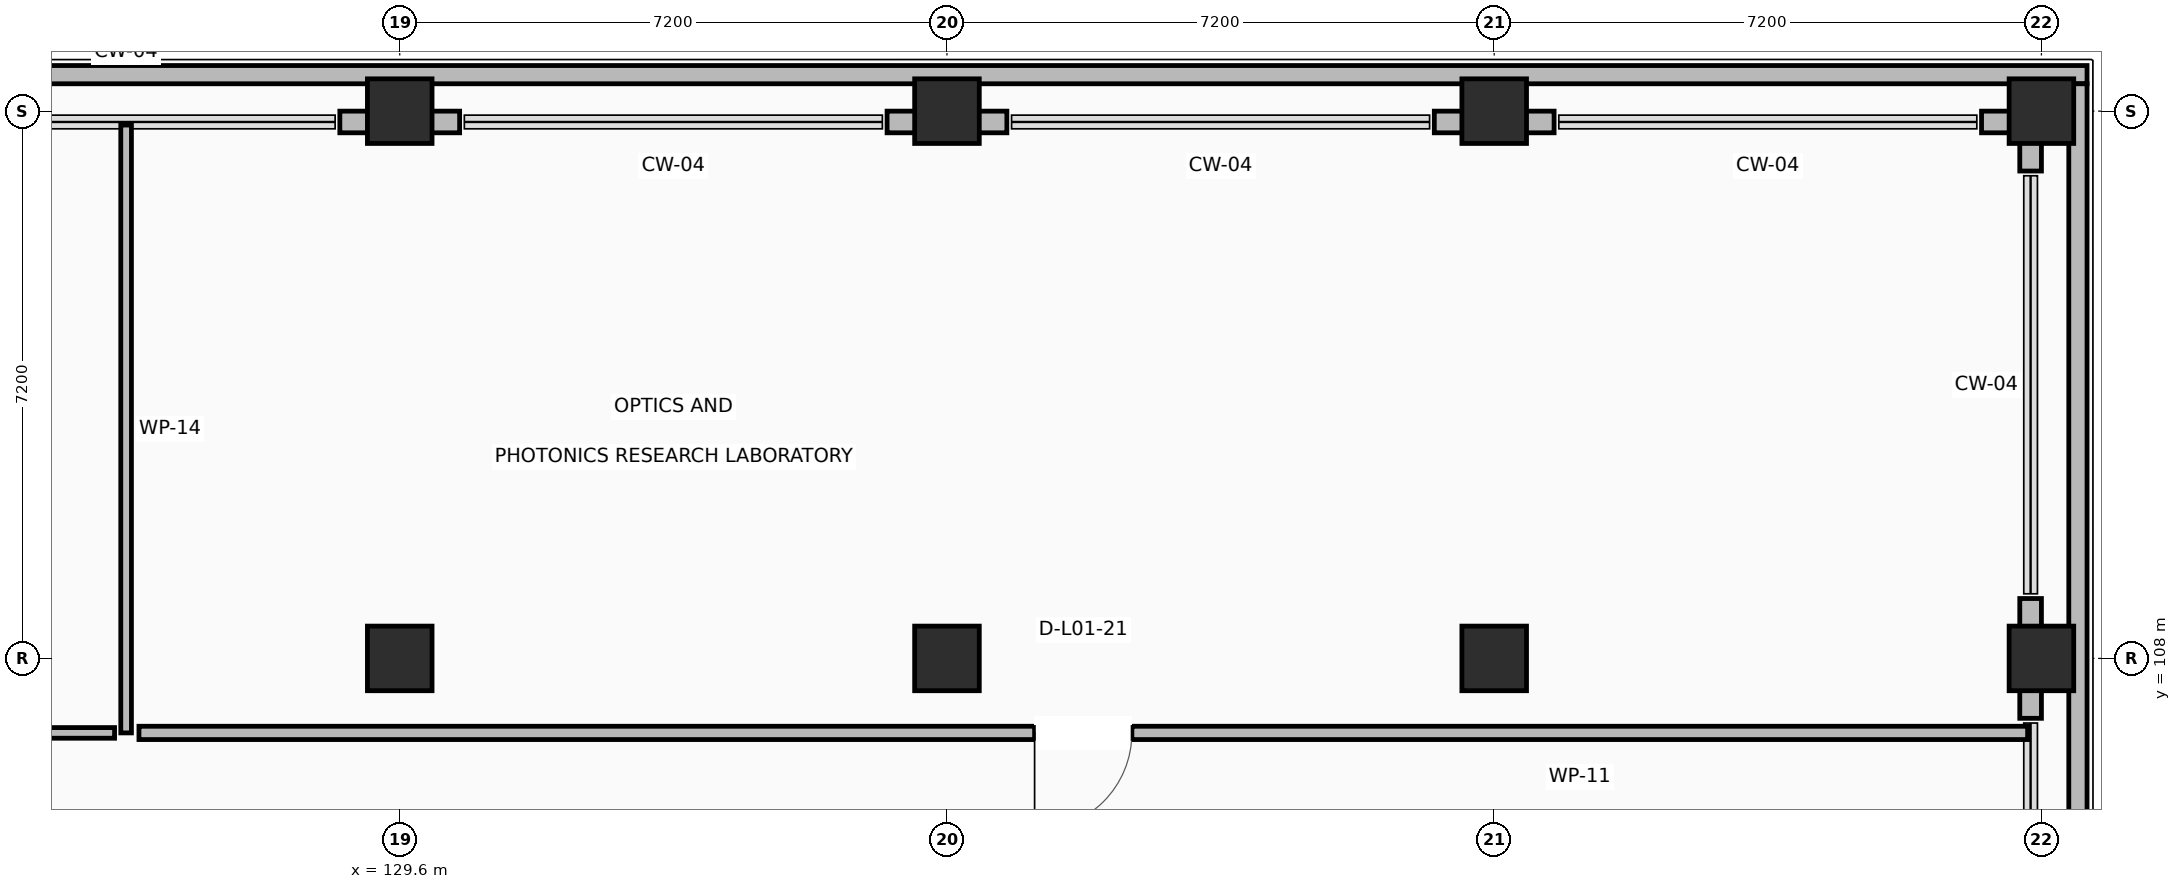
"""IFC4 building model, lengths in metres.
Left out: names, types, materials, properties, quantities, classifications, styles, units other than length and angle.
Written with IfcOpenShell. Run it as: python <this file> out.ifc"""

import sys

from ifc_helpers import new_model, si_unit, direction, frame, frame_2d, origin, origin_2d, place, context, subcontext, project, spatial, rectangle, extrude, element, fill, save


model = new_model("IFC4")
c1 = context("Model", 3, precision=1e-05, world=origin(), true_north=direction((0.0, 1.0)))
c2 = subcontext(c1, "Body", "Model", "MODEL_VIEW")
j1 = project(units=[si_unit("LENGTHUNIT", "METRE"), si_unit("PLANEANGLEUNIT", "RADIAN")], contexts=[c1])
p1 = place(None, origin())
s1 = spatial("IfcSite", under=j1, at=p1, CompositionType="ELEMENT")
p2 = place(p1, origin())
s2 = spatial("IfcBuilding", under=s1, at=p2, CompositionType="ELEMENT")
p3 = place(p2, frame((0.0, 0.0, 4.5)))
s3 = spatial("IfcBuildingStorey", under=s2, at=p3, CompositionType="ELEMENT", Elevation=4.5)
for number, where, z_axis, x_axis in (
    (1, (129.6, 108.0, 0.0), (0.0, 0.0, 1.0), (1.0, 0.0, 0.0)),
    (2, (129.6, 115.2, 0.0), (0.0, 0.0, 1.0), (1.0, 0.0, 0.0)),
    (3, (136.8, 108.0, 0.0), (0.0, 0.0, 1.0), (1.0, 0.0, 0.0)),
    (4, (136.8, 115.2, 0.0), (0.0, 0.0, 1.0), (1.0, 0.0, 0.0)),
    (5, (144.0, 108.0, 0.0), (0.0, 0.0, 1.0), (1.0, 0.0, 0.0)),
    (6, (144.0, 115.2, 0.0), (0.0, 0.0, 1.0), (1.0, 0.0, 0.0)),
    (7, (151.2, 108.0, 0.0), (0.0, 0.0, 1.0), (1.0, 0.0, 0.0)),
    (8, (151.2, 115.2, 0.0), (0.0, 0.0, 1.0), (1.0, 0.0, 0.0)),
):
    element("IfcColumn", number, at=place(p3, frame(where, z_axis=z_axis, x_axis=x_axis)), inside=s3, PredefinedType="COLUMN", context=c2, shape_type="SweptSolid", body=[
        extrude(rectangle(XDim=0.85, YDim=0.85, at=origin_2d()), origin(), (0.0, 0.0, 1.0), 4.22),
    ])
p4 = place(p3, frame((151.058, 107.212, 0.0), z_axis=(0.0, 0.0, 1.0), x_axis=(0.0, 1.0, 0.0)))
e9 = element("IfcWall", 9, at=p4, inside=s3, PredefinedType="STANDARD", context=c2, shape_type="SweptSolid", body=[
    extrude(rectangle(XDim=1.576, YDim=0.285, at=frame_2d((0.788, 0.0))), origin(), (0.0, 0.0, 1.0), 3.26),
])
p5 = place(p3, frame((151.058, 114.412, 0.0), z_axis=(0.0, 0.0, 1.0), x_axis=(0.0, 1.0, 0.0)))
e10 = element("IfcWall", 10, at=p5, inside=s3, PredefinedType="STANDARD", context=c2, shape_type="SweptSolid", body=[
    extrude(rectangle(XDim=0.503, YDim=0.285, at=frame_2d((0.251, 0.0))), origin(), (0.0, 0.0, 1.0), 3.26),
])
p6 = place(p3, frame((151.2, 115.058, 0.0), z_axis=(0.0, 0.0, 1.0), x_axis=(-1.0, 0.0, 0.0)))
e11 = element("IfcWall", 11, at=p6, inside=s3, PredefinedType="STANDARD", context=c2, shape_type="SweptSolid", body=[
    extrude(rectangle(XDim=0.788, YDim=0.285, at=frame_2d((0.394, 0.0))), origin(), (0.0, 0.0, 1.0), 3.26),
])
p7 = place(p3, frame((144.788, 115.058, 0.0), z_axis=(0.0, 0.0, 1.0), x_axis=(-1.0, 0.0, 0.0)))
e12 = element("IfcWall", 12, at=p7, inside=s3, PredefinedType="STANDARD", context=c2, shape_type="SweptSolid", body=[
    extrude(rectangle(XDim=1.576, YDim=0.285, at=frame_2d((0.788, 0.0))), origin(), (0.0, 0.0, 1.0), 3.26),
])
for number, where, z_axis, x_axis in (
    (13, (137.588, 115.058, 0.0), (0.0, 0.0, 1.0), (-1.0, 0.0, 0.0)),
    (14, (130.388, 115.058, 0.0), (0.0, 0.0, 1.0), (-1.0, 0.0, 0.0)),
):
    element("IfcWall", number, at=place(p3, frame(where, z_axis=z_axis, x_axis=x_axis)), inside=s3, PredefinedType="STANDARD", context=c2, shape_type="SweptSolid", body=[
        extrude(rectangle(XDim=1.576, YDim=0.285, at=frame_2d((0.788, 0.0))), origin(), (0.0, 0.0, 1.0), 3.26),
    ])
p8 = place(p3, frame((78.6, 115.68, 0.0), z_axis=(0.0, 0.0, 1.0), x_axis=(1.0, 0.0, 0.0)))
e15 = element("IfcWall", 15, at=p8, inside=s3, PredefinedType="PARAPET", context=c2, shape_type="SweptSolid", body=[
    extrude(rectangle(XDim=73.2, YDim=0.24, at=frame_2d((36.6, 0.0))), origin(), (0.0, 0.0, 1.0), 1.12),
])
p9 = place(p3, frame((151.68, 115.56, 0.0), z_axis=(0.0, 0.0, 1.0), x_axis=(0.0, -1.0, 0.0)))
e16 = element("IfcWall", 16, at=p9, inside=s3, PredefinedType="PARAPET", context=c2, shape_type="SweptSolid", body=[
    extrude(rectangle(XDim=21.36, YDim=0.24, at=frame_2d((10.68, 0.0))), origin(), (0.0, 0.0, 1.0), 1.12),
])
p10 = place(p3, frame((126.0, 115.017, 0.0), z_axis=(0.0, 0.0, 1.0), x_axis=(0.0, -1.0, 0.0)))
e17 = element("IfcWall", 17, at=p10, inside=s3, PredefinedType="PARTITIONING", context=c2, shape_type="SweptSolid", body=[
    extrude(rectangle(XDim=7.997, YDim=0.14, at=frame_2d((3.999, 0.0))), origin(), (0.0, 0.0, 1.0), 3.26),
])
p11 = place(p3, frame((125.848, 107.02, 0.0), z_axis=(0.0, 0.0, 1.0), x_axis=(-1.0, 0.0, 0.0)))
e18 = element("IfcWall", 18, at=p11, inside=s3, PredefinedType="PARTITIONING", context=c2, shape_type="SweptSolid", body=[
    extrude(rectangle(XDim=21.252, YDim=0.14, at=frame_2d((10.626, 0.0))), origin(), (0.0, 0.0, 1.0), 3.26),
])
p12 = place(p11, frame((11.201, 0.0, 0.0)))
e19 = element("IfcOpeningElement", 19, at=p12, cuts=e18, PredefinedType="OPENING", context=c2, shape_type="SweptSolid", body=[
    extrude(rectangle(XDim=0.95, YDim=2.1, at=frame_2d((0.475, 1.05))), frame((0.0, 0.08, 0.0), z_axis=(0.0, -1.0, 0.0), x_axis=(1.0, 0.0, 0.0)), (0.0, 0.0, 1.0), 0.16),
])
p13 = place(p3, frame((151.018, 107.02, 0.0), z_axis=(0.0, 0.0, 1.0), x_axis=(-1.0, 0.0, 0.0)))
e20 = element("IfcWall", 20, at=p13, inside=s3, PredefinedType="PARTITIONING", context=c2, shape_type="SweptSolid", body=[
    extrude(rectangle(XDim=24.849, YDim=0.175, at=frame_2d((12.425, 0.0))), origin(), (0.0, 0.0, 1.0), 3.26),
])
p14 = place(p13, frame((11.785, 0.0, 0.0)))
e21 = element("IfcOpeningElement", 21, at=p14, cuts=e20, PredefinedType="OPENING", context=c2, shape_type="SweptSolid", body=[
    extrude(rectangle(XDim=1.28, YDim=2.15, at=frame_2d((0.64, 1.075))), frame((0.0, 0.097, 0.0), z_axis=(0.0, -1.0, 0.0), x_axis=(1.0, 0.0, 0.0)), (0.0, 0.0, 1.0), 0.195),
])
p15 = place(p14, origin())
e22 = element("IfcDoor", 22, at=p15, inside=s3, OperationType="SINGLE_SWING_RIGHT", PredefinedType="DOOR", context=c2, shape_type="SweptSolid", body=[
    extrude(rectangle(XDim=1.28, YDim=2.15, at=frame_2d((0.64, 1.075))), frame((0.0, 0.025, 0.0), z_axis=(0.0, -1.0, 0.0), x_axis=(1.0, 0.0, 0.0)), (0.0, 0.0, 1.0), 0.05),
])
fill(e21, e22)
save(model, sys.argv[1])
